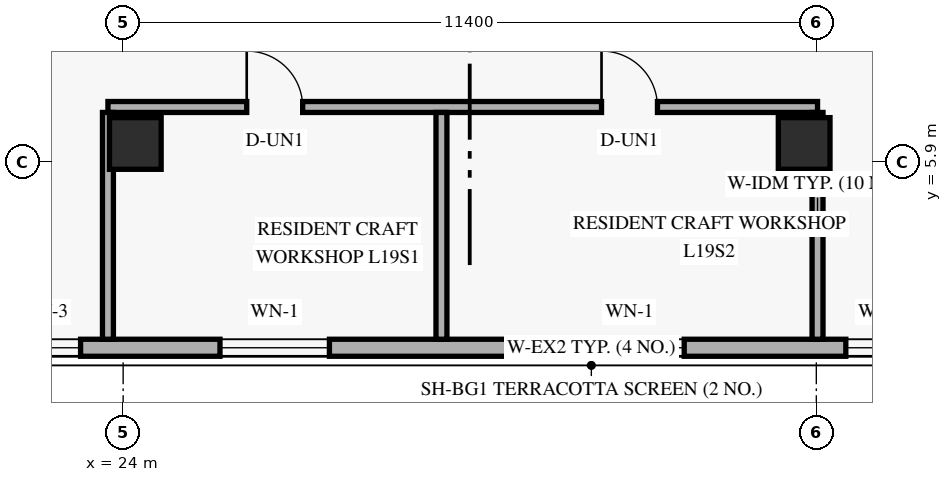
"""IFC4 building model, lengths in metres.
Left out: names, types, materials, properties, quantities, classifications, styles, units other than length and angle.
Written with IfcOpenShell. Run it as: python <this file> out.ifc"""

import sys

from ifc_helpers import new_model, si_unit, direction, frame, frame_2d, origin, origin_2d, place, context, subcontext, project, spatial, rectangle, extrude, element, fill, save


model = new_model("IFC4")
c1 = context("Model", 3, precision=1e-05, world=origin(), true_north=direction((0.0, 1.0)))
c2 = subcontext(c1, "Body", "Model", "MODEL_VIEW")
j1 = project(units=[si_unit("LENGTHUNIT", "METRE"), si_unit("PLANEANGLEUNIT", "RADIAN")], contexts=[c1])
p1 = place(None, origin())
s1 = spatial("IfcSite", under=j1, at=p1, CompositionType="ELEMENT")
p2 = place(p1, origin())
s2 = spatial("IfcBuilding", under=s1, at=p2, CompositionType="ELEMENT")
p3 = place(p2, frame((0.0, 0.0, 76.8)))
s3 = spatial("IfcBuildingStorey", under=s2, at=p3, CompositionType="ELEMENT", Elevation=76.8)
for number, where, z_axis, x_axis in (
    (1, (24.2, 6.2, 0.0), (0.0, 0.0, 1.0), (1.0, 0.0, 0.0)),
    (2, (35.2, 6.2, 0.0), (0.0, 0.0, 1.0), (1.0, 0.0, 0.0)),
):
    element("IfcColumn", number, at=place(p3, frame(where, z_axis=z_axis, x_axis=x_axis)), inside=s3, PredefinedType="COLUMN", context=c2, shape_type="SweptSolid", body=[
        extrude(rectangle(XDim=0.85, YDim=0.85, at=origin_2d()), origin(), (0.0, 0.0, 1.0), 3.6),
    ])
p4 = place(p3, frame((13.42, 2.84, 0.0), z_axis=(0.0, 0.0, 1.0), x_axis=(1.0, 0.0, 0.0)))
e3 = element("IfcWall", 3, at=p4, inside=s3, PredefinedType="SOLIDWALL", context=c2, shape_type="SweptSolid", body=[
    extrude(rectangle(XDim=36.56, YDim=0.28, at=frame_2d((18.28, 0.0))), origin(), (0.0, 0.0, 1.0), 3.36),
])
p5 = place(p4, frame((3.845, 0.0, 0.85)))
e4 = element("IfcOpeningElement", 4, at=p5, cuts=e3, PredefinedType="OPENING", context=c2, shape_type="SweptSolid", body=[
    extrude(rectangle(XDim=1.8, YDim=1.6, at=frame_2d((0.9, 0.8))), frame((0.0, 0.15, 0.0), z_axis=(0.0, -1.0, 0.0), x_axis=(1.0, 0.0, 0.0)), (0.0, 0.0, 1.0), 0.3),
])
p6 = place(p4, frame((8.68, 0.0, 0.85)))
e5 = element("IfcOpeningElement", 5, at=p6, cuts=e3, PredefinedType="OPENING", context=c2, shape_type="SweptSolid", body=[
    extrude(rectangle(XDim=1.2, YDim=1.5, at=frame_2d((0.6, 0.75))), frame((0.0, 0.15, 0.0), z_axis=(0.0, -1.0, 0.0), x_axis=(1.0, 0.0, 0.0)), (0.0, 0.0, 1.0), 0.3),
])
p7 = place(p4, frame((12.172, 0.0, 0.85)))
e6 = element("IfcOpeningElement", 6, at=p7, cuts=e3, PredefinedType="OPENING", context=c2, shape_type="SweptSolid", body=[
    extrude(rectangle(XDim=1.8, YDim=1.6, at=frame_2d((0.9, 0.8))), frame((0.0, 0.15, 0.0), z_axis=(0.0, -1.0, 0.0), x_axis=(1.0, 0.0, 0.0)), (0.0, 0.0, 1.0), 0.3),
])
p8 = place(p4, frame((18.008, 0.0, 0.85)))
e7 = element("IfcOpeningElement", 7, at=p8, cuts=e3, PredefinedType="OPENING", context=c2, shape_type="SweptSolid", body=[
    extrude(rectangle(XDim=1.8, YDim=1.6, at=frame_2d((0.9, 0.8))), frame((0.0, 0.15, 0.0), z_axis=(0.0, -1.0, 0.0), x_axis=(1.0, 0.0, 0.0)), (0.0, 0.0, 1.0), 0.3),
])
p9 = place(p4, frame((22.465, 0.0, 0.85)))
e8 = element("IfcOpeningElement", 8, at=p9, cuts=e3, PredefinedType="OPENING", context=c2, shape_type="SweptSolid", body=[
    extrude(rectangle(XDim=1.2, YDim=1.5, at=frame_2d((0.6, 0.75))), frame((0.0, 0.15, 0.0), z_axis=(0.0, -1.0, 0.0), x_axis=(1.0, 0.0, 0.0)), (0.0, 0.0, 1.0), 0.3),
])
p10 = place(p4, frame((27.286, 0.0, 0.85)))
e9 = element("IfcOpeningElement", 9, at=p10, cuts=e3, PredefinedType="OPENING", context=c2, shape_type="SweptSolid", body=[
    extrude(rectangle(XDim=1.8, YDim=1.6, at=frame_2d((0.9, 0.8))), frame((0.0, 0.15, 0.0), z_axis=(0.0, -1.0, 0.0), x_axis=(1.0, 0.0, 0.0)), (0.0, 0.0, 1.0), 0.3),
])
p11 = place(p4, frame((33.501, 0.0, 0.85)))
e10 = element("IfcOpeningElement", 10, at=p11, cuts=e3, PredefinedType="OPENING", context=c2, shape_type="SweptSolid", body=[
    extrude(rectangle(XDim=1.8, YDim=1.6, at=frame_2d((0.9, 0.8))), frame((0.0, 0.15, 0.0), z_axis=(0.0, -1.0, 0.0), x_axis=(1.0, 0.0, 0.0)), (0.0, 0.0, 1.0), 0.3),
])
p12 = place(p3, frame((23.75, 6.8, 0.0), z_axis=(0.0, 0.0, 1.0), x_axis=(1.0, 0.0, 0.0)))
e11 = element("IfcWall", 11, at=p12, inside=s3, PredefinedType="STANDARD", context=c2, shape_type="SweptSolid", body=[
    extrude(rectangle(XDim=11.67, YDim=0.18, at=frame_2d((5.835, 0.0))), origin(), (0.0, 0.0, 1.0), 2.731),
])
p13 = place(p12, frame((2.282, 0.0, 0.0)))
e12 = element("IfcOpeningElement", 12, at=p13, cuts=e11, PredefinedType="OPENING", context=c2, shape_type="SweptSolid", body=[
    extrude(rectangle(XDim=0.92, YDim=2.15, at=frame_2d((0.46, 1.075))), frame((0.0, 0.1, 0.0), z_axis=(0.0, -1.0, 0.0), x_axis=(1.0, 0.0, 0.0)), (0.0, 0.0, 1.0), 0.2),
])
p14 = place(p12, frame((8.117, 0.0, 0.0)))
e13 = element("IfcOpeningElement", 13, at=p14, cuts=e11, PredefinedType="OPENING", context=c2, shape_type="SweptSolid", body=[
    extrude(rectangle(XDim=0.92, YDim=2.15, at=frame_2d((0.46, 1.075))), frame((0.0, 0.1, 0.0), z_axis=(0.0, -1.0, 0.0), x_axis=(1.0, 0.0, 0.0)), (0.0, 0.0, 1.0), 0.2),
])
p15 = place(p3, frame((35.42, 2.98, 0.0), z_axis=(0.0, 0.0, 1.0), x_axis=(0.0, 1.0, 0.0)))
e14 = element("IfcWall", 14, at=p15, inside=s3, PredefinedType="PARTITIONING", context=c2, shape_type="SweptSolid", body=[
    extrude(rectangle(XDim=3.73, YDim=0.18, at=frame_2d((1.865, 0.0))), origin(), (0.0, 0.0, 1.0), 2.731),
])
for number, where, z_axis, x_axis in (
    (15, (23.75, 2.98, 0.0), (0.0, 0.0, 1.0), (0.0, 1.0, 0.0)),
    (16, (29.235, 2.98, 0.0), (0.0, 0.0, 1.0), (0.0, 1.0, 0.0)),
):
    element("IfcWall", number, at=place(p3, frame(where, z_axis=z_axis, x_axis=x_axis)), inside=s3, PredefinedType="PARTITIONING", context=c2, shape_type="SweptSolid", body=[
        extrude(rectangle(XDim=3.73, YDim=0.18, at=frame_2d((1.865, 0.0))), origin(), (0.0, 0.0, 1.0), 2.809),
    ])
p16 = place(p6, origin())
e17 = element("IfcWindow", 17, at=p16, inside=s3, PartitioningType="SINGLE_PANEL", PredefinedType="WINDOW", context=c2, shape_type="SweptSolid", body=[
    extrude(rectangle(XDim=1.2, YDim=1.5, at=frame_2d((0.6, 0.75))), frame((0.0, 0.03, 0.0), z_axis=(0.0, -1.0, 0.0), x_axis=(1.0, 0.0, 0.0)), (0.0, 0.0, 1.0), 0.06),
])
fill(e5, e17)
p17 = place(p7, origin())
e18 = element("IfcWindow", 18, at=p17, inside=s3, PartitioningType="SINGLE_PANEL", PredefinedType="WINDOW", context=c2, shape_type="SweptSolid", body=[
    extrude(rectangle(XDim=1.8, YDim=1.6, at=frame_2d((0.9, 0.8))), frame((0.0, 0.03, 0.0), z_axis=(0.0, -1.0, 0.0), x_axis=(1.0, 0.0, 0.0)), (0.0, 0.0, 1.0), 0.06),
])
fill(e6, e18)
p18 = place(p8, origin())
e19 = element("IfcWindow", 19, at=p18, inside=s3, PartitioningType="SINGLE_PANEL", PredefinedType="WINDOW", context=c2, shape_type="SweptSolid", body=[
    extrude(rectangle(XDim=1.8, YDim=1.6, at=frame_2d((0.9, 0.8))), frame((0.0, 0.03, 0.0), z_axis=(0.0, -1.0, 0.0), x_axis=(1.0, 0.0, 0.0)), (0.0, 0.0, 1.0), 0.06),
])
fill(e7, e19)
p19 = place(p9, origin())
e20 = element("IfcWindow", 20, at=p19, inside=s3, PartitioningType="SINGLE_PANEL", PredefinedType="WINDOW", context=c2, shape_type="SweptSolid", body=[
    extrude(rectangle(XDim=1.2, YDim=1.5, at=frame_2d((0.6, 0.75))), frame((0.0, 0.03, 0.0), z_axis=(0.0, -1.0, 0.0), x_axis=(1.0, 0.0, 0.0)), (0.0, 0.0, 1.0), 0.06),
])
fill(e8, e20)
p20 = place(p13, origin())
e21 = element("IfcDoor", 21, at=p20, inside=s3, OperationType="SINGLE_SWING_LEFT", PredefinedType="DOOR", context=c2, shape_type="SweptSolid", body=[
    extrude(rectangle(XDim=0.92, YDim=2.15, at=frame_2d((0.46, 1.075))), frame((0.0, 0.025, 0.0), z_axis=(0.0, -1.0, 0.0), x_axis=(1.0, 0.0, 0.0)), (0.0, 0.0, 1.0), 0.05),
])
fill(e12, e21)
p21 = place(p14, origin())
e22 = element("IfcDoor", 22, at=p21, inside=s3, OperationType="SINGLE_SWING_LEFT", PredefinedType="DOOR", context=c2, shape_type="SweptSolid", body=[
    extrude(rectangle(XDim=0.92, YDim=2.15, at=frame_2d((0.46, 1.075))), frame((0.0, 0.025, 0.0), z_axis=(0.0, -1.0, 0.0), x_axis=(1.0, 0.0, 0.0)), (0.0, 0.0, 1.0), 0.05),
])
fill(e13, e22)
save(model, sys.argv[1])
